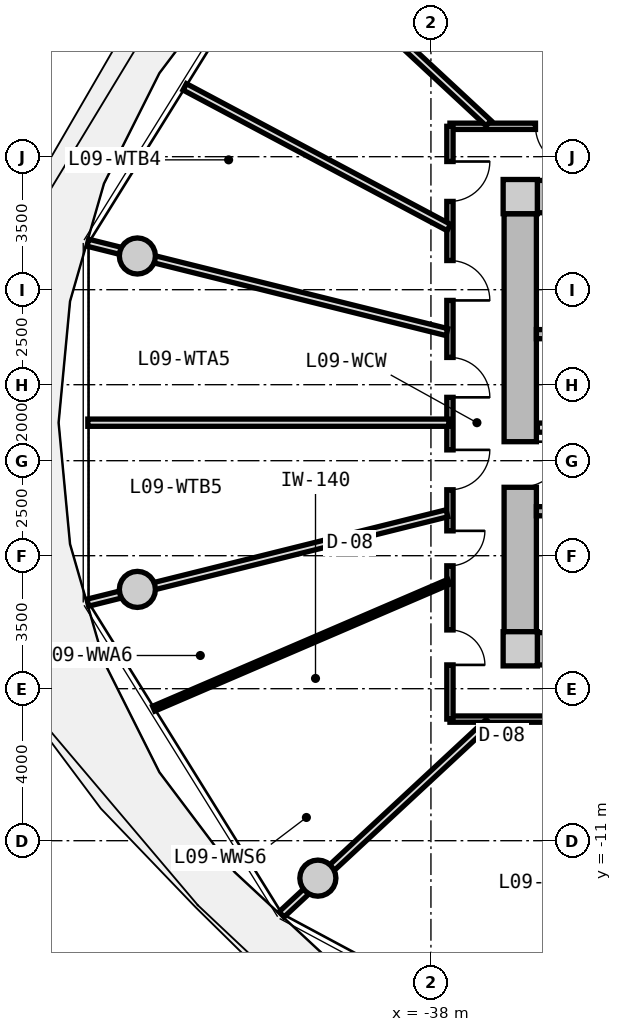
"""IFC4 building model, lengths in metres.
Left out: names, types, materials, properties, quantities, classifications, styles, units other than length and angle.
Written with IfcOpenShell. Run it as: python <this file> out.ifc"""

import sys

from ifc_helpers import new_model, si_unit, direction, frame, frame_2d, origin, origin_2d, place, context, subcontext, project, spatial, rectangle, circle, extrude, source, transform, mapped, element, fill, save


model = new_model("IFC4")
c1 = context("Model", 3, precision=1e-05, world=origin(), true_north=direction((0.0, 1.0)))
c2 = subcontext(c1, "Body", "Model", "MODEL_VIEW")
j1 = project(units=[si_unit("LENGTHUNIT", "METRE"), si_unit("PLANEANGLEUNIT", "RADIAN")], contexts=[c1])
p1 = place(None, origin())
s1 = spatial("IfcSite", under=j1, at=p1, CompositionType="ELEMENT")
p2 = place(p1, origin())
s2 = spatial("IfcBuilding", under=s1, at=p2, CompositionType="ELEMENT")
p3 = place(p2, frame((0.0, 0.0, 33.8)))
s3 = spatial("IfcBuildingStorey", under=s2, at=p3, CompositionType="ELEMENT", Elevation=33.8)
m1 = source(origin(), c2, "Body", "SweptSolid", [
    extrude(rectangle(XDim=0.9, YDim=0.9, at=origin_2d()), origin(), (0.0, 0.0, 1.0), 3.05),
])
for number, where, z_axis, x_axis in (
    (1, (-35.65, -5.95, 0.0), (0.0, 0.0, 1.0), (1.0, 0.0, 0.0)),
    (2, (-35.65, 5.95, 0.0), (0.0, 0.0, 1.0), (1.0, 0.0, 0.0)),
):
    element("IfcColumn", number, at=place(p3, frame(where, z_axis=z_axis, x_axis=x_axis)), inside=s3, PredefinedType="COLUMN", context=c2, shape_type="MappedRepresentation", body=[
        mapped(m1, transform((0.0, 0.0, 0.0), x_axis=(1.0, 0.0, 0.0), y_axis=(0.0, 1.0, 0.0), z_axis=(0.0, 0.0, 1.0), scale=1.0)),
    ])
m2 = source(origin(), c2, "Body", "SweptSolid", [
    extrude(rectangle(XDim=14.4, YDim=0.85, at=frame_2d((7.2, 0.0))), origin(), (0.0, 0.0, 1.0), 2.79),
])
for number, where, z_axis, x_axis in (
    (3, (-35.2, 5.95, 0.0), (0.0, 0.0, 1.0), (1.0, 0.0, 0.0)),
    (4, (-20.8, -5.95, 0.0), (0.0, 0.0, 1.0), (-1.0, 0.0, 0.0)),
):
    element("IfcWall", number, at=place(p3, frame(where, z_axis=z_axis, x_axis=x_axis)), inside=s3, PredefinedType="SHEAR", context=c2, shape_type="MappedRepresentation", body=[
        mapped(m2, transform((0.0, 0.0, 0.0), x_axis=(1.0, 0.0, 0.0), y_axis=(0.0, 1.0, 0.0), z_axis=(0.0, 0.0, 1.0), scale=1.0)),
    ])
m3 = source(origin(), c2, "Body", "SweptSolid", [
    extrude(rectangle(XDim=11.0, YDim=0.85, at=frame_2d((5.5, 0.0))), origin(), (0.0, 0.0, 1.0), 2.79),
])
p4 = place(p3, frame((-35.65, -5.5, 0.0), z_axis=(0.0, 0.0, 1.0), x_axis=(0.0, 1.0, 0.0)))
e5 = element("IfcWall", 5, at=p4, inside=s3, PredefinedType="SHEAR", context=c2, shape_type="MappedRepresentation", body=[
    mapped(m3, transform((0.0, 0.0, 0.0), x_axis=(1.0, 0.0, 0.0), y_axis=(0.0, 1.0, 0.0), z_axis=(0.0, 0.0, 1.0), scale=1.0)),
])
p5 = place(p4, frame((3.8, 0.0, 0.0)))
e6 = element("IfcOpeningElement", 6, at=p5, cuts=e5, PredefinedType="OPENING", context=c2, shape_type="SweptSolid", body=[
    extrude(rectangle(XDim=1.2, YDim=2.15, at=frame_2d((0.6, 1.075))), frame((0.0, 0.435, 0.0), z_axis=(0.0, -1.0, 0.0), x_axis=(1.0, 0.0, 0.0)), (0.0, 0.0, 1.0), 0.87),
])
m4 = source(origin(), c2, "Body", "SweptSolid", [
    extrude(circle(Radius=0.475, at=origin_2d()), origin(), (0.0, 0.0, 1.0), 3.05),
])
for number, where, z_axis, x_axis in (
    (7, (-45.725, 4.387, 0.0), (0.0, 0.0, 1.0), (1.0, 0.0, 0.0)),
    (8, (-45.725, -4.387, 0.0), (0.0, 0.0, 1.0), (1.0, 0.0, 0.0)),
    (9, (-40.975, -11.985, 0.0), (0.0, 0.0, 1.0), (1.0, 0.0, 0.0)),
):
    element("IfcColumn", number, at=place(p3, frame(where, z_axis=z_axis, x_axis=x_axis)), inside=s3, PredefinedType="COLUMN", context=c2, shape_type="MappedRepresentation", body=[
        mapped(m4, transform((0.0, 0.0, 0.0), x_axis=(1.0, 0.0, 0.0), y_axis=(0.0, 1.0, 0.0), z_axis=(0.0, 0.0, 1.0), scale=1.0)),
    ])
m5 = source(origin(), c2, "Body", "SweptSolid", [
    extrude(rectangle(XDim=7.765, YDim=0.24, at=frame_2d((3.883, 0.0))), origin(), (0.0, 0.0, 1.0), 2.79),
])
p6 = place(p3, frame((-35.225, 2.33, 0.0), z_axis=(0.0, 0.0, 1.0), x_axis=(1.0, 0.0, 0.0)))
e10 = element("IfcWall", 10, at=p6, inside=s3, PredefinedType="PARTITIONING", context=c2, shape_type="MappedRepresentation", body=[
    mapped(m5, transform((0.0, 0.0, 0.0), x_axis=(1.0, 0.0, 0.0), y_axis=(0.0, 1.0, 0.0), z_axis=(0.0, 0.0, 1.0), scale=1.0)),
])
p7 = place(p3, frame((-35.225, -2.33, 0.0), z_axis=(0.0, 0.0, 1.0), x_axis=(1.0, 0.0, 0.0)))
e11 = element("IfcWall", 11, at=p7, inside=s3, PredefinedType="PARTITIONING", context=c2, shape_type="MappedRepresentation", body=[
    mapped(m5, transform((0.0, 0.0, 0.0), x_axis=(1.0, 0.0, 0.0), y_axis=(0.0, 1.0, 0.0), z_axis=(0.0, 0.0, 1.0), scale=1.0)),
])
p8 = place(p7, frame((0.885, 0.0, 0.0)))
e12 = element("IfcOpeningElement", 12, at=p8, cuts=e11, PredefinedType="OPENING", context=c2, shape_type="SweptSolid", body=[
    extrude(rectangle(XDim=1.1, YDim=2.15, at=frame_2d((0.55, 1.075))), frame((0.0, 0.13, 0.0), z_axis=(0.0, -1.0, 0.0), x_axis=(1.0, 0.0, 0.0)), (0.0, 0.0, 1.0), 0.26),
])
m6 = source(origin(), c2, "Body", "SweptSolid", [
    extrude(rectangle(XDim=7.62, YDim=0.24, at=frame_2d((3.81, 0.0))), origin(), (0.0, 0.0, 1.0), 2.775),
])
p9 = place(p3, frame((-35.2, -0.13, 0.0), z_axis=(0.0, 0.0, 1.0), x_axis=(1.0, 0.0, 0.0)))
e13 = element("IfcWall", 13, at=p9, inside=s3, PredefinedType="PARTITIONING", context=c2, shape_type="MappedRepresentation", body=[
    mapped(m6, transform((0.0, 0.0, 0.0), x_axis=(1.0, 0.0, 0.0), y_axis=(0.0, 1.0, 0.0), z_axis=(0.0, 0.0, 1.0), scale=1.0)),
])
p10 = place(p9, frame((6.22, 0.0, 0.0)))
e14 = element("IfcOpeningElement", 14, at=p10, cuts=e13, PredefinedType="OPENING", context=c2, shape_type="SweptSolid", body=[
    extrude(rectangle(XDim=1.0, YDim=2.1, at=frame_2d((0.5, 1.05))), frame((0.0, 0.13, 0.0), z_axis=(0.0, -1.0, 0.0), x_axis=(1.0, 0.0, 0.0)), (0.0, 0.0, 1.0), 0.26),
])
p11 = place(p9, frame((0.85, 0.0, 0.0)))
e15 = element("IfcOpeningElement", 15, at=p11, cuts=e13, PredefinedType="OPENING", context=c2, shape_type="SweptSolid", body=[
    extrude(rectangle(XDim=1.1, YDim=2.2, at=frame_2d((0.55, 1.1))), frame((0.0, 0.13, 0.0), z_axis=(0.0, -1.0, 0.0), x_axis=(1.0, 0.0, 0.0)), (0.0, 0.0, 1.0), 0.26),
])
p12 = place(p9, frame((3.85, 0.0, 0.0)))
e16 = element("IfcOpeningElement", 16, at=p12, cuts=e13, PredefinedType="OPENING", context=c2, shape_type="SweptSolid", body=[
    extrude(rectangle(XDim=1.1, YDim=2.2, at=frame_2d((0.55, 1.1))), frame((0.0, 0.13, 0.0), z_axis=(0.0, -1.0, 0.0), x_axis=(1.0, 0.0, 0.0)), (0.0, 0.0, 1.0), 0.26),
])
m7 = source(origin(), c2, "Body", "SweptSolid", [
    extrude(rectangle(XDim=19.0, YDim=0.165, at=frame_2d((9.5, 0.0))), origin(), (0.0, 0.0, 1.0), 2.775),
])
p13 = place(p3, frame((-37.5, 7.8, 0.0), z_axis=(0.0, 0.0, 1.0), x_axis=(1.0, 0.0, 0.0)))
e17 = element("IfcWall", 17, at=p13, inside=s3, PredefinedType="PARTITIONING", context=c2, shape_type="MappedRepresentation", body=[
    mapped(m7, transform((0.0, 0.0, 0.0), x_axis=(1.0, 0.0, 0.0), y_axis=(0.0, 1.0, 0.0), z_axis=(0.0, 0.0, 1.0), scale=1.0)),
])
p14 = place(p13, frame((9.352, 0.0, 0.0)))
e18 = element("IfcOpeningElement", 18, at=p14, cuts=e17, PredefinedType="OPENING", context=c2, shape_type="SweptSolid", body=[
    extrude(rectangle(XDim=1.05, YDim=2.15, at=frame_2d((0.525, 1.075))), frame((0.0, 0.093, 0.0), z_axis=(0.0, -1.0, 0.0), x_axis=(1.0, 0.0, 0.0)), (0.0, 0.0, 1.0), 0.185),
])
p15 = place(p13, frame((7.806, 0.0, 0.0)))
e19 = element("IfcOpeningElement", 19, at=p15, cuts=e17, PredefinedType="OPENING", context=c2, shape_type="SweptSolid", body=[
    extrude(rectangle(XDim=1.05, YDim=2.15, at=frame_2d((0.525, 1.075))), frame((0.0, 0.093, 0.0), z_axis=(0.0, -1.0, 0.0), x_axis=(1.0, 0.0, 0.0)), (0.0, 0.0, 1.0), 0.185),
])
p16 = place(p13, frame((4.773, 0.0, 0.0)))
e20 = element("IfcOpeningElement", 20, at=p16, cuts=e17, PredefinedType="OPENING", context=c2, shape_type="SweptSolid", body=[
    extrude(rectangle(XDim=1.05, YDim=2.15, at=frame_2d((0.525, 1.075))), frame((0.0, 0.093, 0.0), z_axis=(0.0, -1.0, 0.0), x_axis=(1.0, 0.0, 0.0)), (0.0, 0.0, 1.0), 0.185),
])
p17 = place(p13, frame((2.251, 0.0, 0.0)))
e21 = element("IfcOpeningElement", 21, at=p17, cuts=e17, PredefinedType="OPENING", context=c2, shape_type="SweptSolid", body=[
    extrude(rectangle(XDim=1.05, YDim=2.15, at=frame_2d((0.525, 1.075))), frame((0.0, 0.093, 0.0), z_axis=(0.0, -1.0, 0.0), x_axis=(1.0, 0.0, 0.0)), (0.0, 0.0, 1.0), 0.185),
])
p18 = place(p13, frame((14.653, 0.0, 0.0)))
e22 = element("IfcOpeningElement", 22, at=p18, cuts=e17, PredefinedType="OPENING", context=c2, shape_type="SweptSolid", body=[
    extrude(rectangle(XDim=1.05, YDim=2.15, at=frame_2d((0.525, 1.075))), frame((0.0, 0.093, 0.0), z_axis=(0.0, -1.0, 0.0), x_axis=(1.0, 0.0, 0.0)), (0.0, 0.0, 1.0), 0.185),
])
p19 = place(p13, frame((12.5, 0.0, 0.0)))
e23 = element("IfcOpeningElement", 23, at=p19, cuts=e17, PredefinedType="OPENING", context=c2, shape_type="SweptSolid", body=[
    extrude(rectangle(XDim=1.05, YDim=2.15, at=frame_2d((0.525, 1.075))), frame((0.0, 0.093, 0.0), z_axis=(0.0, -1.0, 0.0), x_axis=(1.0, 0.0, 0.0)), (0.0, 0.0, 1.0), 0.185),
])
p20 = place(p3, frame((-18.5, -7.8, 0.0), z_axis=(0.0, 0.0, 1.0), x_axis=(-1.0, 0.0, 0.0)))
e24 = element("IfcWall", 24, at=p20, inside=s3, PredefinedType="PARTITIONING", context=c2, shape_type="MappedRepresentation", body=[
    mapped(m7, transform((0.0, 0.0, 0.0), x_axis=(1.0, 0.0, 0.0), y_axis=(0.0, 1.0, 0.0), z_axis=(0.0, 0.0, 1.0), scale=1.0)),
])
p21 = place(p20, frame((14.244, 0.0, 0.0)))
e25 = element("IfcOpeningElement", 25, at=p21, cuts=e24, PredefinedType="OPENING", context=c2, shape_type="SweptSolid", body=[
    extrude(rectangle(XDim=1.25, YDim=2.2, at=frame_2d((0.625, 1.1))), frame((0.0, 0.093, 0.0), z_axis=(0.0, -1.0, 0.0), x_axis=(1.0, 0.0, 0.0)), (0.0, 0.0, 1.0), 0.185),
])
p22 = place(p20, frame((8.875, 0.0, 0.0)))
e26 = element("IfcOpeningElement", 26, at=p22, cuts=e24, PredefinedType="OPENING", context=c2, shape_type="SweptSolid", body=[
    extrude(rectangle(XDim=1.25, YDim=2.2, at=frame_2d((0.625, 1.1))), frame((0.0, 0.093, 0.0), z_axis=(0.0, -1.0, 0.0), x_axis=(1.0, 0.0, 0.0)), (0.0, 0.0, 1.0), 0.185),
])
p23 = place(p20, frame((3.506, 0.0, 0.0)))
e27 = element("IfcOpeningElement", 27, at=p23, cuts=e24, PredefinedType="OPENING", context=c2, shape_type="SweptSolid", body=[
    extrude(rectangle(XDim=1.25, YDim=2.2, at=frame_2d((0.625, 1.1))), frame((0.0, 0.093, 0.0), z_axis=(0.0, -1.0, 0.0), x_axis=(1.0, 0.0, 0.0)), (0.0, 0.0, 1.0), 0.185),
])
m8 = source(origin(), c2, "Body", "SweptSolid", [
    extrude(rectangle(XDim=15.6, YDim=0.165, at=frame_2d((7.8, 0.0))), origin(), (0.0, 0.0, 1.0), 2.775),
])
p24 = place(p3, frame((-37.5, -7.8, 0.0), z_axis=(0.0, 0.0, 1.0), x_axis=(0.0, 1.0, 0.0)))
e28 = element("IfcWall", 28, at=p24, inside=s3, PredefinedType="PARTITIONING", context=c2, shape_type="MappedRepresentation", body=[
    mapped(m8, transform((0.0, 0.0, 0.0), x_axis=(1.0, 0.0, 0.0), y_axis=(0.0, 1.0, 0.0), z_axis=(0.0, 0.0, 1.0), scale=1.0)),
])
p25 = place(p24, frame((13.623, 0.0, 0.0)))
e29 = element("IfcOpeningElement", 29, at=p25, cuts=e28, PredefinedType="OPENING", context=c2, shape_type="SweptSolid", body=[
    extrude(rectangle(XDim=1.05, YDim=2.15, at=frame_2d((0.525, 1.075))), frame((0.0, 0.093, 0.0), z_axis=(0.0, -1.0, 0.0), x_axis=(1.0, 0.0, 0.0)), (0.0, 0.0, 1.0), 0.185),
])
p26 = place(p24, frame((11.018, 0.0, 0.0)))
e30 = element("IfcOpeningElement", 30, at=p26, cuts=e28, PredefinedType="OPENING", context=c2, shape_type="SweptSolid", body=[
    extrude(rectangle(XDim=1.05, YDim=2.15, at=frame_2d((0.525, 1.075))), frame((0.0, 0.093, 0.0), z_axis=(0.0, -1.0, 0.0), x_axis=(1.0, 0.0, 0.0)), (0.0, 0.0, 1.0), 0.185),
])
p27 = place(p24, frame((8.467, 0.0, 0.0)))
e31 = element("IfcOpeningElement", 31, at=p27, cuts=e28, PredefinedType="OPENING", context=c2, shape_type="SweptSolid", body=[
    extrude(rectangle(XDim=1.05, YDim=2.15, at=frame_2d((0.525, 1.075))), frame((0.0, 0.093, 0.0), z_axis=(0.0, -1.0, 0.0), x_axis=(1.0, 0.0, 0.0)), (0.0, 0.0, 1.0), 0.185),
])
p28 = place(p24, frame((6.035, 0.0, 0.0)))
e32 = element("IfcOpeningElement", 32, at=p28, cuts=e28, PredefinedType="OPENING", context=c2, shape_type="SweptSolid", body=[
    extrude(rectangle(XDim=1.05, YDim=2.15, at=frame_2d((0.525, 1.075))), frame((0.0, 0.093, 0.0), z_axis=(0.0, -1.0, 0.0), x_axis=(1.0, 0.0, 0.0)), (0.0, 0.0, 1.0), 0.185),
])
p29 = place(p24, frame((4.034, 0.0, 0.0)))
e33 = element("IfcOpeningElement", 33, at=p29, cuts=e28, PredefinedType="OPENING", context=c2, shape_type="SweptSolid", body=[
    extrude(rectangle(XDim=0.92, YDim=2.1, at=frame_2d((0.46, 1.05))), frame((0.0, 0.093, 0.0), z_axis=(0.0, -1.0, 0.0), x_axis=(1.0, 0.0, 0.0)), (0.0, 0.0, 1.0), 0.185),
])
p30 = place(p24, frame((1.426, 0.0, 0.0)))
e34 = element("IfcOpeningElement", 34, at=p30, cuts=e28, PredefinedType="OPENING", context=c2, shape_type="SweptSolid", body=[
    extrude(rectangle(XDim=0.92, YDim=2.1, at=frame_2d((0.46, 1.05))), frame((0.0, 0.093, 0.0), z_axis=(0.0, -1.0, 0.0), x_axis=(1.0, 0.0, 0.0)), (0.0, 0.0, 1.0), 0.185),
])
m9 = source(origin(), c2, "Body", "SweptSolid", [
    extrude(rectangle(XDim=7.435, YDim=0.19, at=frame_2d((3.717, 0.0))), origin(), (0.0, 0.0, 1.0), 2.225),
])
p31 = place(p3, frame((-36.483, 7.88, 0.0), z_axis=(0.0, 0.0, 1.0), x_axis=(-0.732651956848, 0.680603489652, 0.0)))
e35 = element("IfcWall", 35, at=p31, inside=s3, PredefinedType="PARTITIONING", context=c2, shape_type="MappedRepresentation", body=[
    mapped(m9, transform((0.0, 0.0, 0.0), x_axis=(1.0, 0.0, 0.0), y_axis=(0.0, 1.0, 0.0), z_axis=(0.0, 0.0, 1.0), scale=1.0)),
])
m10 = source(origin(), c2, "Body", "SweptSolid", [
    extrude(rectangle(XDim=8.598, YDim=0.19, at=frame_2d((4.299, 0.0))), origin(), (0.0, 0.0, 1.0), 2.775),
])
p32 = place(p3, frame((-32.957, 8.017, 0.0), z_axis=(0.0, 0.0, 1.0), x_axis=(-0.530039776395, 0.847972779893, 0.0)))
e36 = element("IfcWall", 36, at=p32, inside=s3, PredefinedType="PARTITIONING", context=c2, shape_type="MappedRepresentation", body=[
    mapped(m10, transform((0.0, 0.0, 0.0), x_axis=(1.0, 0.0, 0.0), y_axis=(0.0, 1.0, 0.0), z_axis=(0.0, 0.0, 1.0), scale=1.0)),
])
m11 = source(origin(), c2, "Body", "SweptSolid", [
    extrude(rectangle(XDim=9.737, YDim=0.19, at=frame_2d((4.869, 0.0))), origin(), (0.0, 0.0, 1.0), 2.225),
])
p33 = place(p3, frame((-37.58, 2.385, 0.0), z_axis=(0.0, 0.0, 1.0), x_axis=(-0.970392716238, 0.241532557375, 0.0)))
e37 = element("IfcWall", 37, at=p33, inside=s3, PredefinedType="PARTITIONING", context=c2, shape_type="MappedRepresentation", body=[
    mapped(m11, transform((0.0, 0.0, 0.0), x_axis=(1.0, 0.0, 0.0), y_axis=(0.0, 1.0, 0.0), z_axis=(0.0, 0.0, 1.0), scale=1.0)),
])
m12 = source(origin(), c2, "Body", "SweptSolid", [
    extrude(rectangle(XDim=7.873, YDim=0.19, at=frame_2d((3.937, 0.0))), origin(), (0.0, 0.0, 1.0), 2.775),
])
p34 = place(p3, frame((-37.53, 5.138, 0.0), z_axis=(0.0, 0.0, 1.0), x_axis=(-0.882666052726, 0.470000680175, 0.0)))
e38 = element("IfcWall", 38, at=p34, inside=s3, PredefinedType="PARTITIONING", context=c2, shape_type="MappedRepresentation", body=[
    mapped(m12, transform((0.0, 0.0, 0.0), x_axis=(1.0, 0.0, 0.0), y_axis=(0.0, 1.0, 0.0), z_axis=(0.0, 0.0, 1.0), scale=1.0)),
])
p35 = place(p3, frame((-37.58, -2.385, 0.0), z_axis=(0.0, 0.0, 1.0), x_axis=(-0.970392716238, -0.241532557375, 0.0)))
e39 = element("IfcWall", 39, at=p35, inside=s3, PredefinedType="PARTITIONING", context=c2, shape_type="MappedRepresentation", body=[
    mapped(m11, transform((0.0, 0.0, 0.0), x_axis=(1.0, 0.0, 0.0), y_axis=(0.0, 1.0, 0.0), z_axis=(0.0, 0.0, 1.0), scale=1.0)),
])
m13 = source(origin(), c2, "Body", "SweptSolid", [
    extrude(rectangle(XDim=9.499, YDim=0.19, at=frame_2d((4.75, 0.0))), origin(), (0.0, 0.0, 1.0), 2.775),
])
p36 = place(p3, frame((-37.53, 0.0, 0.0), z_axis=(0.0, 0.0, 1.0), x_axis=(-1.0, 0.0, 0.0)))
e40 = element("IfcWall", 40, at=p36, inside=s3, PredefinedType="PARTITIONING", context=c2, shape_type="MappedRepresentation", body=[
    mapped(m13, transform((0.0, 0.0, 0.0), x_axis=(1.0, 0.0, 0.0), y_axis=(0.0, 1.0, 0.0), z_axis=(0.0, 0.0, 1.0), scale=1.0)),
])
p37 = place(p3, frame((-36.483, -7.88, 0.0), z_axis=(0.0, 0.0, 1.0), x_axis=(-0.732651956848, -0.680603489652, 0.0)))
e41 = element("IfcWall", 41, at=p37, inside=s3, PredefinedType="PARTITIONING", context=c2, shape_type="MappedRepresentation", body=[
    mapped(m9, transform((0.0, 0.0, 0.0), x_axis=(1.0, 0.0, 0.0), y_axis=(0.0, 1.0, 0.0), z_axis=(0.0, 0.0, 1.0), scale=1.0)),
])
m14 = source(origin(), c2, "Body", "SweptSolid", [
    extrude(rectangle(XDim=8.452, YDim=0.14, at=frame_2d((4.226, 0.0))), origin(), (0.0, 0.0, 1.0), 2.775),
])
p38 = place(p3, frame((-37.53, -4.188, 0.0), z_axis=(0.0, 0.0, 1.0), x_axis=(-0.918706709896, -0.394940478036, 0.0)))
e42 = element("IfcWall", 42, at=p38, inside=s3, PredefinedType="PARTITIONING", context=c2, shape_type="MappedRepresentation", body=[
    mapped(m14, transform((0.0, 0.0, 0.0), x_axis=(1.0, 0.0, 0.0), y_axis=(0.0, 1.0, 0.0), z_axis=(0.0, 0.0, 1.0), scale=1.0)),
])
m15 = source(origin(), c2, "Body", "SweptSolid", [
    extrude(rectangle(XDim=1.2, YDim=2.15, at=frame_2d((0.6, 1.075))), frame((0.0, 0.025, 0.0), z_axis=(0.0, -1.0, 0.0), x_axis=(1.0, 0.0, 0.0)), (0.0, 0.0, 1.0), 0.05),
])
p39 = place(p5, frame((1.2, 0.0, 0.0), z_axis=(0.0, 0.0, 1.0), x_axis=(-1.0, 0.0, 0.0)))
e43 = element("IfcDoor", 43, at=p39, inside=s3, OperationType="SINGLE_SWING_LEFT", PredefinedType="DOOR", context=c2, shape_type="MappedRepresentation", body=[
    mapped(m15, transform((0.0, 0.0, 0.0), x_axis=(1.0, 0.0, 0.0), y_axis=(0.0, 1.0, 0.0), z_axis=(0.0, 0.0, 1.0), scale=1.0)),
])
fill(e6, e43)
m16 = source(origin(), c2, "Body", "SweptSolid", [
    extrude(rectangle(XDim=1.05, YDim=2.15, at=frame_2d((0.525, 1.075))), frame((0.0, 0.025, 0.0), z_axis=(0.0, -1.0, 0.0), x_axis=(1.0, 0.0, 0.0)), (0.0, 0.0, 1.0), 0.05),
])
p40 = place(p17, frame((1.05, 0.0, 0.0), z_axis=(0.0, 0.0, 1.0), x_axis=(-1.0, 0.0, 0.0)))
e44 = element("IfcDoor", 44, at=p40, inside=s3, OperationType="SINGLE_SWING_LEFT", PredefinedType="DOOR", context=c2, shape_type="MappedRepresentation", body=[
    mapped(m16, transform((0.0, 0.0, 0.0), x_axis=(1.0, 0.0, 0.0), y_axis=(0.0, 1.0, 0.0), z_axis=(0.0, 0.0, 1.0), scale=1.0)),
])
fill(e21, e44)
p41 = place(p25, frame((1.05, 0.0, 0.0), z_axis=(0.0, 0.0, 1.0), x_axis=(-1.0, 0.0, 0.0)))
e45 = element("IfcDoor", 45, at=p41, inside=s3, OperationType="SINGLE_SWING_LEFT", PredefinedType="DOOR", context=c2, shape_type="MappedRepresentation", body=[
    mapped(m16, transform((0.0, 0.0, 0.0), x_axis=(1.0, 0.0, 0.0), y_axis=(0.0, 1.0, 0.0), z_axis=(0.0, 0.0, 1.0), scale=1.0)),
])
fill(e29, e45)
p42 = place(p26, frame((1.05, 0.0, 0.0), z_axis=(0.0, 0.0, 1.0), x_axis=(-1.0, 0.0, 0.0)))
e46 = element("IfcDoor", 46, at=p42, inside=s3, OperationType="SINGLE_SWING_RIGHT", PredefinedType="DOOR", context=c2, shape_type="MappedRepresentation", body=[
    mapped(m16, transform((0.0, 0.0, 0.0), x_axis=(1.0, 0.0, 0.0), y_axis=(0.0, 1.0, 0.0), z_axis=(0.0, 0.0, 1.0), scale=1.0)),
])
fill(e30, e46)
p43 = place(p27, frame((1.05, 0.0, 0.0), z_axis=(0.0, 0.0, 1.0), x_axis=(-1.0, 0.0, 0.0)))
e47 = element("IfcDoor", 47, at=p43, inside=s3, OperationType="SINGLE_SWING_RIGHT", PredefinedType="DOOR", context=c2, shape_type="MappedRepresentation", body=[
    mapped(m16, transform((0.0, 0.0, 0.0), x_axis=(1.0, 0.0, 0.0), y_axis=(0.0, 1.0, 0.0), z_axis=(0.0, 0.0, 1.0), scale=1.0)),
])
fill(e31, e47)
p44 = place(p28, frame((1.05, 0.0, 0.0), z_axis=(0.0, 0.0, 1.0), x_axis=(-1.0, 0.0, 0.0)))
e48 = element("IfcDoor", 48, at=p44, inside=s3, OperationType="SINGLE_SWING_LEFT", PredefinedType="DOOR", context=c2, shape_type="MappedRepresentation", body=[
    mapped(m16, transform((0.0, 0.0, 0.0), x_axis=(1.0, 0.0, 0.0), y_axis=(0.0, 1.0, 0.0), z_axis=(0.0, 0.0, 1.0), scale=1.0)),
])
fill(e32, e48)
m17 = source(origin(), c2, "Body", "SweptSolid", [
    extrude(rectangle(XDim=0.92, YDim=2.1, at=frame_2d((0.46, 1.05))), frame((0.0, 0.025, 0.0), z_axis=(0.0, -1.0, 0.0), x_axis=(1.0, 0.0, 0.0)), (0.0, 0.0, 1.0), 0.05),
])
p45 = place(p29, frame((0.92, 0.0, 0.0), z_axis=(0.0, 0.0, 1.0), x_axis=(-1.0, 0.0, 0.0)))
e49 = element("IfcDoor", 49, at=p45, inside=s3, OperationType="SINGLE_SWING_LEFT", PredefinedType="DOOR", context=c2, shape_type="MappedRepresentation", body=[
    mapped(m17, transform((0.0, 0.0, 0.0), x_axis=(1.0, 0.0, 0.0), y_axis=(0.0, 1.0, 0.0), z_axis=(0.0, 0.0, 1.0), scale=1.0)),
])
fill(e33, e49)
p46 = place(p30, frame((0.92, 0.0, 0.0), z_axis=(0.0, 0.0, 1.0), x_axis=(-1.0, 0.0, 0.0)))
e50 = element("IfcDoor", 50, at=p46, inside=s3, OperationType="SINGLE_SWING_RIGHT", PredefinedType="DOOR", context=c2, shape_type="MappedRepresentation", body=[
    mapped(m17, transform((0.0, 0.0, 0.0), x_axis=(1.0, 0.0, 0.0), y_axis=(0.0, 1.0, 0.0), z_axis=(0.0, 0.0, 1.0), scale=1.0)),
])
fill(e34, e50)
save(model, sys.argv[1])
